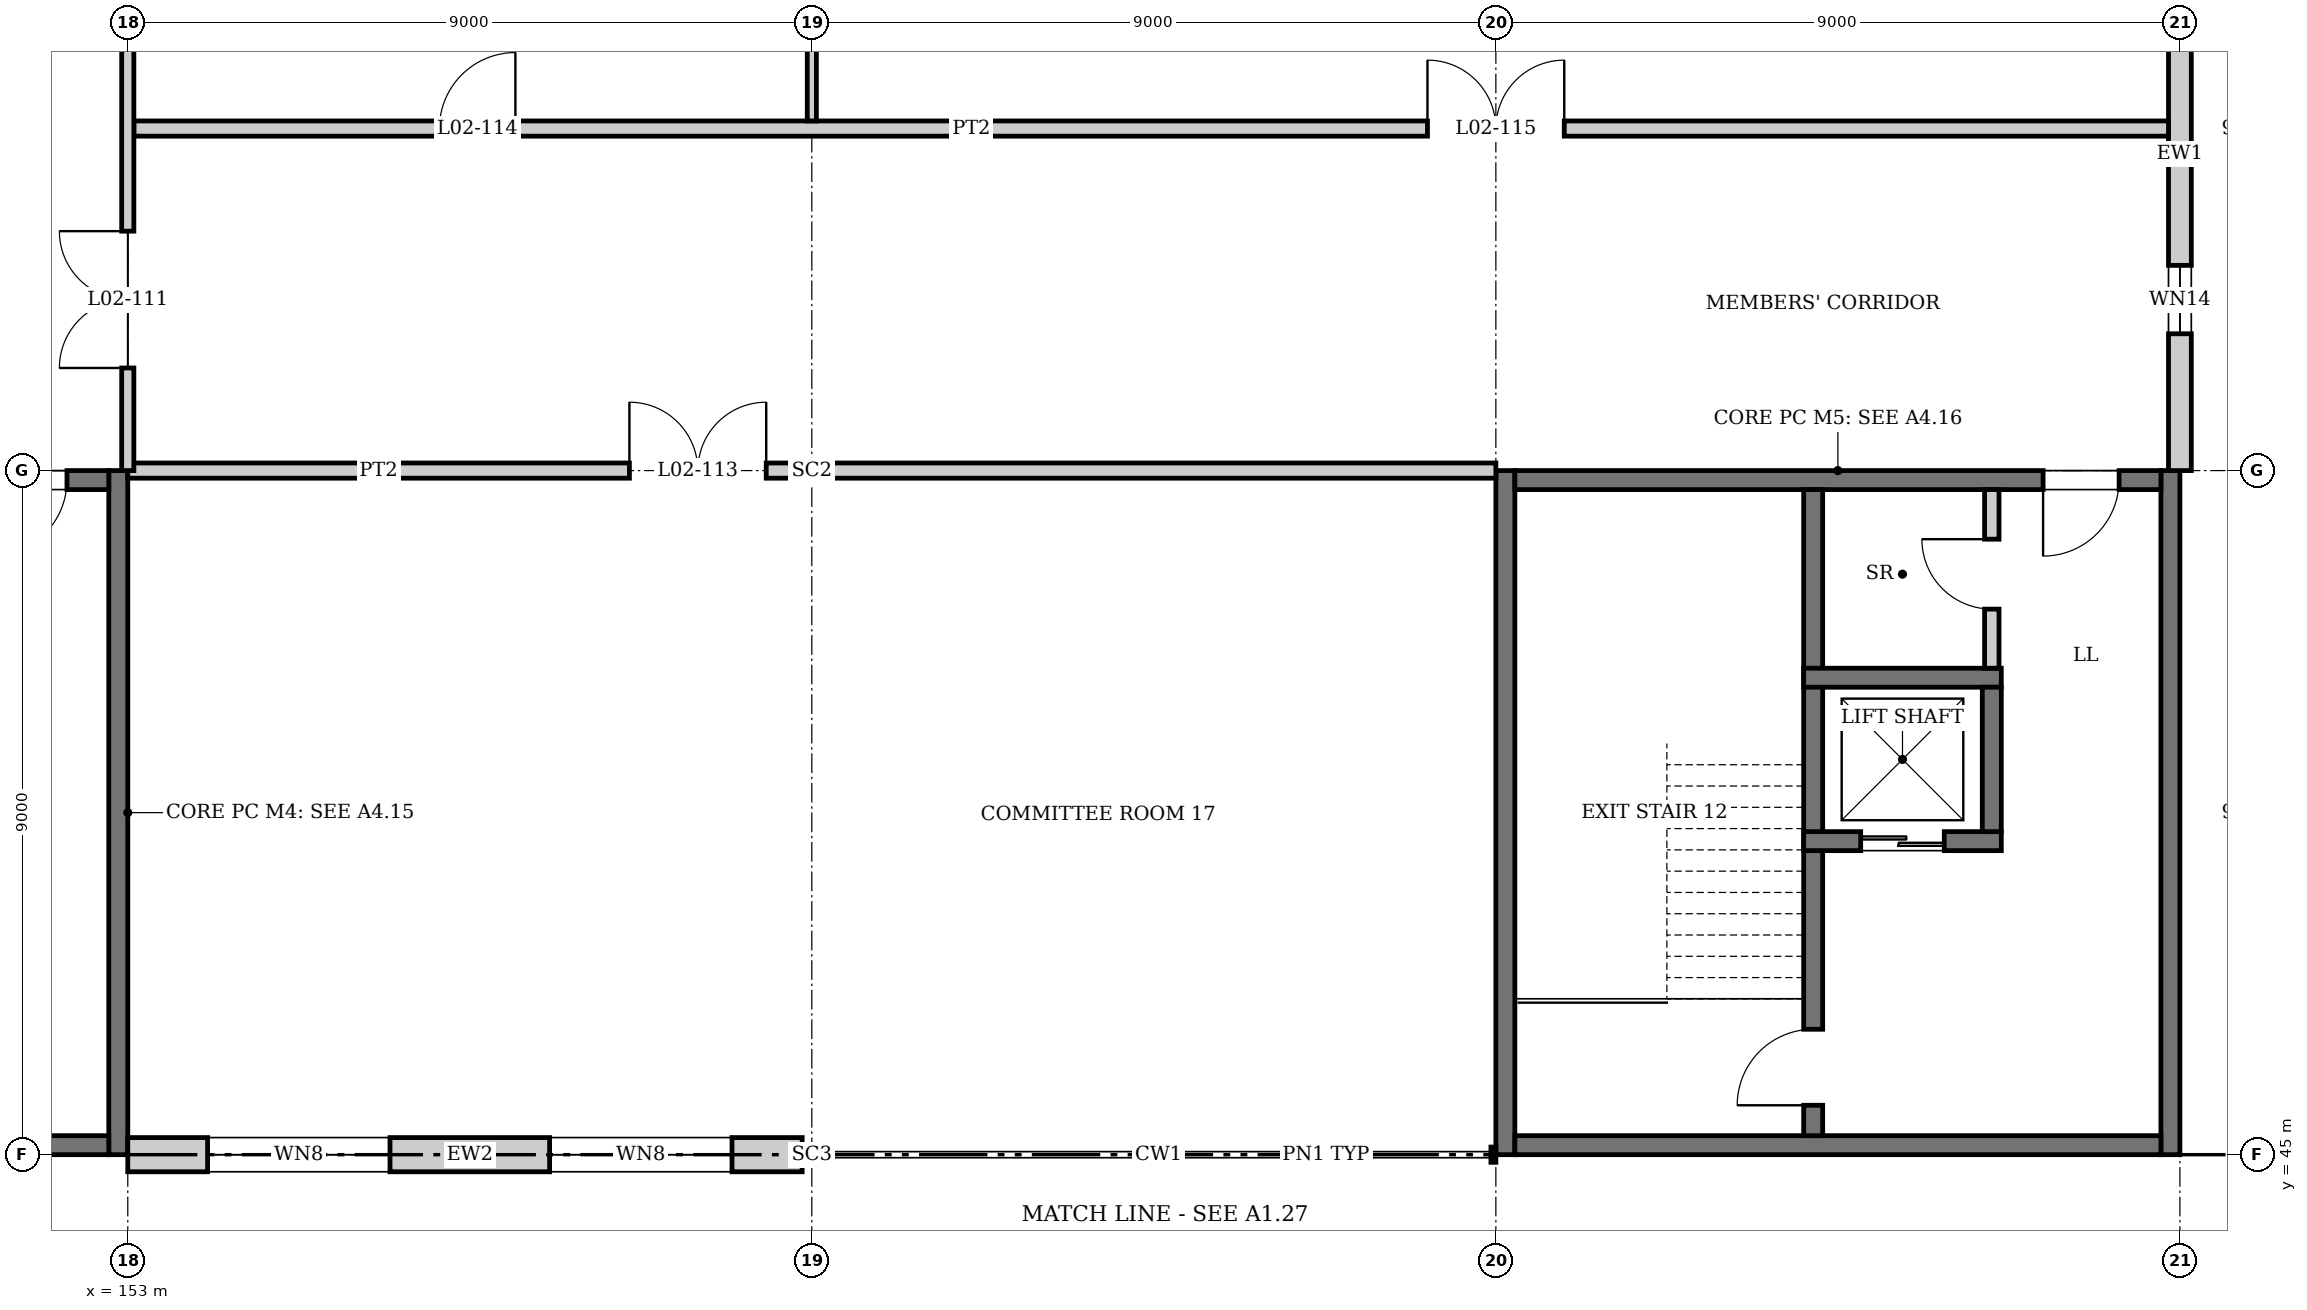
"""IFC4 building model, lengths in metres.
Left out: names, types, materials, properties, quantities, classifications, styles, units other than length and angle.
Written with IfcOpenShell. Run it as: python <this file> out.ifc"""

import sys

from ifc_helpers import new_model, si_unit, direction, frame, frame_2d, origin, origin_2d, place, context, subcontext, project, spatial, rectangle, i_section, extrude, element, fill, save


model = new_model("IFC4")
c1 = context("Model", 3, precision=1e-05, world=origin(), true_north=direction((0.0, 1.0)))
c2 = subcontext(c1, "Body", "Model", "MODEL_VIEW")
j1 = project(units=[si_unit("LENGTHUNIT", "METRE"), si_unit("PLANEANGLEUNIT", "RADIAN")], contexts=[c1])
p1 = place(None, origin())
s1 = spatial("IfcSite", under=j1, at=p1, CompositionType="ELEMENT")
p2 = place(p1, origin())
s2 = spatial("IfcBuilding", under=s1, at=p2, CompositionType="ELEMENT")
p3 = place(p2, frame((0.0, 0.0, 10.5)))
s3 = spatial("IfcBuildingStorey", under=s2, at=p3, CompositionType="ELEMENT", Elevation=10.5)
p4 = place(p3, frame((162.0, 45.0, 0.0), z_axis=(0.0, 0.0, 1.0), x_axis=(0.0, 1.0, 0.0)))
e1 = element("IfcColumn", 1, at=p4, inside=s3, PredefinedType="COLUMN", context=c2, shape_type="SweptSolid", body=[
    extrude(i_section(OverallWidth=0.254, OverallDepth=0.254, WebThickness=0.009, FlangeThickness=0.014, at=origin_2d()), origin(), (0.0, 0.0, 1.0), 4.5),
])
p5 = place(p3, frame((162.0, 54.0, 0.0), z_axis=(0.0, 0.0, 1.0), x_axis=(0.0, 1.0, 0.0)))
e2 = element("IfcColumn", 2, at=p5, inside=s3, PredefinedType="COLUMN", context=c2, shape_type="SweptSolid", body=[
    extrude(i_section(OverallWidth=0.256, OverallDepth=0.26, WebThickness=0.01, FlangeThickness=0.017, at=origin_2d()), origin(), (0.0, 0.0, 1.0), 4.5),
])
p6 = place(p3, frame((152.875, 45.0, 0.0), z_axis=(0.0, 0.0, 1.0), x_axis=(0.0, 1.0, 0.0)))
e3 = element("IfcWall", 3, at=p6, inside=s3, PredefinedType="SHEAR", context=c2, shape_type="SweptSolid", body=[
    extrude(rectangle(XDim=9.0, YDim=0.25, at=frame_2d((4.5, 0.0))), origin(), (0.0, 0.0, 1.0), 4.35),
])
p7 = place(p3, frame((144.25, 45.125, 0.0), z_axis=(0.0, 0.0, 1.0), x_axis=(1.0, 0.0, 0.0)))
e4 = element("IfcWall", 4, at=p7, inside=s3, PredefinedType="SHEAR", context=c2, shape_type="SweptSolid", body=[
    extrude(rectangle(XDim=8.5, YDim=0.25, at=frame_2d((4.25, 0.0))), origin(), (0.0, 0.0, 1.0), 4.35),
])
p8 = place(p3, frame((144.25, 53.875, 0.0), z_axis=(0.0, 0.0, 1.0), x_axis=(1.0, 0.0, 0.0)))
e5 = element("IfcWall", 5, at=p8, inside=s3, PredefinedType="SHEAR", context=c2, shape_type="SweptSolid", body=[
    extrude(rectangle(XDim=8.5, YDim=0.25, at=frame_2d((4.25, 0.0))), origin(), (0.0, 0.0, 1.0), 4.35),
])
p9 = place(p8, frame((6.95, 0.0, 0.0)))
e6 = element("IfcOpeningElement", 6, at=p9, cuts=e5, PredefinedType="OPENING", context=c2, shape_type="SweptSolid", body=[
    extrude(rectangle(XDim=1.0, YDim=2.1, at=frame_2d((0.5, 1.05))), frame((0.0, 0.135, 0.0), z_axis=(0.0, -1.0, 0.0), x_axis=(1.0, 0.0, 0.0)), (0.0, 0.0, 1.0), 0.27),
])
for number, where, z_axis, x_axis in (
    (7, (171.125, 45.0, 0.0), (0.0, 0.0, 1.0), (0.0, 1.0, 0.0)),
    (8, (179.875, 45.0, 0.0), (0.0, 0.0, 1.0), (0.0, 1.0, 0.0)),
):
    element("IfcWall", number, at=place(p3, frame(where, z_axis=z_axis, x_axis=x_axis)), inside=s3, PredefinedType="SHEAR", context=c2, shape_type="SweptSolid", body=[
        extrude(rectangle(XDim=9.0, YDim=0.25, at=frame_2d((4.5, 0.0))), origin(), (0.0, 0.0, 1.0), 4.35),
    ])
p10 = place(p3, frame((171.25, 45.125, 0.0), z_axis=(0.0, 0.0, 1.0), x_axis=(1.0, 0.0, 0.0)))
e9 = element("IfcWall", 9, at=p10, inside=s3, PredefinedType="SHEAR", context=c2, shape_type="SweptSolid", body=[
    extrude(rectangle(XDim=8.5, YDim=0.25, at=frame_2d((4.25, 0.0))), origin(), (0.0, 0.0, 1.0), 4.35),
])
p11 = place(p3, frame((171.25, 53.875, 0.0), z_axis=(0.0, 0.0, 1.0), x_axis=(1.0, 0.0, 0.0)))
e10 = element("IfcWall", 10, at=p11, inside=s3, PredefinedType="SHEAR", context=c2, shape_type="SweptSolid", body=[
    extrude(rectangle(XDim=8.5, YDim=0.25, at=frame_2d((4.25, 0.0))), origin(), (0.0, 0.0, 1.0), 4.35),
])
p12 = place(p11, frame((6.95, 0.0, 0.0)))
e11 = element("IfcOpeningElement", 11, at=p12, cuts=e10, PredefinedType="OPENING", context=c2, shape_type="SweptSolid", body=[
    extrude(rectangle(XDim=1.0, YDim=2.1, at=frame_2d((0.5, 1.05))), frame((0.0, 0.135, 0.0), z_axis=(0.0, -1.0, 0.0), x_axis=(1.0, 0.0, 0.0)), (0.0, 0.0, 1.0), 0.27),
])
p13 = place(p3, frame((153.0, 45.0, 0.0), z_axis=(0.0, 0.0, 1.0), x_axis=(1.0, 0.0, 0.0)))
e12 = element("IfcWall", 12, at=p13, inside=s3, PredefinedType="SOLIDWALL", context=c2, shape_type="SweptSolid", body=[
    extrude(rectangle(XDim=8.873, YDim=0.45, at=frame_2d((4.437, 0.0))), origin(), (0.0, 0.0, 1.0), 3.991),
])
p14 = place(p13, frame((1.05, 0.0, 0.9)))
e13 = element("IfcOpeningElement", 13, at=p14, cuts=e12, PredefinedType="OPENING", context=c2, shape_type="SweptSolid", body=[
    extrude(rectangle(XDim=2.4, YDim=2.1, at=frame_2d((1.2, 1.05))), frame((0.0, 0.235, 0.0), z_axis=(0.0, -1.0, 0.0), x_axis=(1.0, 0.0, 0.0)), (0.0, 0.0, 1.0), 0.47),
])
p15 = place(p13, frame((5.55, 0.0, 0.9)))
e14 = element("IfcOpeningElement", 14, at=p15, cuts=e12, PredefinedType="OPENING", context=c2, shape_type="SweptSolid", body=[
    extrude(rectangle(XDim=2.4, YDim=2.1, at=frame_2d((1.2, 1.05))), frame((0.0, 0.235, 0.0), z_axis=(0.0, -1.0, 0.0), x_axis=(1.0, 0.0, 0.0)), (0.0, 0.0, 1.0), 0.47),
])
p16 = place(p3, frame((180.0, 54.0, 0.0), z_axis=(0.0, 0.0, 1.0), x_axis=(0.0, 1.0, 0.0)))
e15 = element("IfcWall", 15, at=p16, inside=s3, PredefinedType="SOLIDWALL", context=c2, shape_type="SweptSolid", body=[
    extrude(rectangle(XDim=8.873, YDim=0.3, at=frame_2d((4.437, 0.0))), origin(), (0.0, 0.0, 1.0), 3.991),
])
p17 = place(p16, frame((1.8, 0.0, 0.6)))
e16 = element("IfcOpeningElement", 16, at=p17, cuts=e15, PredefinedType="OPENING", context=c2, shape_type="SweptSolid", body=[
    extrude(rectangle(XDim=0.9, YDim=2.7, at=frame_2d((0.45, 1.35))), frame((0.0, 0.16, 0.0), z_axis=(0.0, -1.0, 0.0), x_axis=(1.0, 0.0, 0.0)), (0.0, 0.0, 1.0), 0.32),
])
p18 = place(p16, frame((5.625, 0.0, 0.9)))
e17 = element("IfcOpeningElement", 17, at=p18, cuts=e15, PredefinedType="OPENING", context=c2, shape_type="SweptSolid", body=[
    extrude(rectangle(XDim=2.25, YDim=1.8, at=frame_2d((1.125, 0.9))), frame((0.0, 0.16, 0.0), z_axis=(0.0, -1.0, 0.0), x_axis=(1.0, 0.0, 0.0)), (0.0, 0.0, 1.0), 0.32),
])
p19 = place(p3, frame((175.175, 45.25, 0.0), z_axis=(0.0, 0.0, 1.0), x_axis=(0.0, 1.0, 0.0)))
e18 = element("IfcWall", 18, at=p19, inside=s3, PredefinedType="SOLIDWALL", context=c2, shape_type="SweptSolid", body=[
    extrude(rectangle(XDim=8.5, YDim=0.25, at=frame_2d((4.25, 0.0))), origin(), (0.0, 0.0, 1.0), 4.35),
])
p20 = place(p19, frame((0.4, 0.0, 0.0)))
e19 = element("IfcOpeningElement", 19, at=p20, cuts=e18, PredefinedType="OPENING", context=c2, shape_type="SweptSolid", body=[
    extrude(rectangle(XDim=1.0, YDim=2.1, at=frame_2d((0.5, 1.05))), frame((0.0, 0.135, 0.0), z_axis=(0.0, -1.0, 0.0), x_axis=(1.0, 0.0, 0.0)), (0.0, 0.0, 1.0), 0.27),
])
p21 = place(p3, frame((175.05, 49.125, 0.0), z_axis=(0.0, 0.0, 1.0), x_axis=(1.0, 0.0, 0.0)))
e20 = element("IfcWall", 20, at=p21, inside=s3, PredefinedType="SOLIDWALL", context=c2, shape_type="SweptSolid", body=[
    extrude(rectangle(XDim=2.6, YDim=0.25, at=frame_2d((1.3, 0.0))), origin(), (0.0, 0.0, 1.0), 4.35),
])
p22 = place(p21, frame((0.75, 0.0, 0.0)))
e21 = element("IfcOpeningElement", 21, at=p22, cuts=e20, PredefinedType="OPENING", context=c2, shape_type="SweptSolid", body=[
    extrude(rectangle(XDim=1.1, YDim=2.1, at=frame_2d((0.55, 1.05))), frame((0.0, 0.135, 0.0), z_axis=(0.0, -1.0, 0.0), x_axis=(1.0, 0.0, 0.0)), (0.0, 0.0, 1.0), 0.27),
])
p23 = place(p3, frame((175.05, 51.275, 0.0), z_axis=(0.0, 0.0, 1.0), x_axis=(1.0, 0.0, 0.0)))
e22 = element("IfcWall", 22, at=p23, inside=s3, PredefinedType="SOLIDWALL", context=c2, shape_type="SweptSolid", body=[
    extrude(rectangle(XDim=2.6, YDim=0.25, at=frame_2d((1.3, 0.0))), origin(), (0.0, 0.0, 1.0), 4.35),
])
p24 = place(p3, frame((177.525, 49.25, 0.0), z_axis=(0.0, 0.0, 1.0), x_axis=(0.0, 1.0, 0.0)))
e23 = element("IfcWall", 23, at=p24, inside=s3, PredefinedType="SOLIDWALL", context=c2, shape_type="SweptSolid", body=[
    extrude(rectangle(XDim=1.9, YDim=0.25, at=frame_2d((0.95, 0.0))), origin(), (0.0, 0.0, 1.0), 4.35),
])
p25 = place(p3, frame((153.0, 54.0, 0.0), z_axis=(0.0, 0.0, 1.0), x_axis=(1.0, 0.0, 0.0)))
e24 = element("IfcWall", 24, at=p25, inside=s3, PredefinedType="PARTITIONING", context=c2, shape_type="SweptSolid", body=[
    extrude(rectangle(XDim=8.87, YDim=0.2, at=frame_2d((4.435, 0.0))), origin(), (0.0, 0.0, 1.0), 3.738),
])
p26 = place(p25, frame((6.6, 0.0, 0.0)))
e25 = element("IfcOpeningElement", 25, at=p26, cuts=e24, PredefinedType="OPENING", context=c2, shape_type="SweptSolid", body=[
    extrude(rectangle(XDim=1.8, YDim=2.1, at=frame_2d((0.9, 1.05))), frame((0.0, 0.11, 0.0), z_axis=(0.0, -1.0, 0.0), x_axis=(1.0, 0.0, 0.0)), (0.0, 0.0, 1.0), 0.22),
])
p27 = place(p3, frame((162.13, 54.0, 0.0), z_axis=(0.0, 0.0, 1.0), x_axis=(1.0, 0.0, 0.0)))
e26 = element("IfcWall", 26, at=p27, inside=s3, PredefinedType="PARTITIONING", context=c2, shape_type="SweptSolid", body=[
    extrude(rectangle(XDim=8.87, YDim=0.2, at=frame_2d((4.435, 0.0))), origin(), (0.0, 0.0, 1.0), 3.738),
])
p28 = place(p3, frame((153.08, 58.5, 0.0), z_axis=(0.0, 0.0, 1.0), x_axis=(1.0, 0.0, 0.0)))
e27 = element("IfcWall", 27, at=p28, inside=s3, PredefinedType="PARTITIONING", context=c2, shape_type="SweptSolid", body=[
    extrude(rectangle(XDim=26.77, YDim=0.2, at=frame_2d((13.385, 0.0))), origin(), (0.0, 0.0, 1.0), 3.65),
])
p29 = place(p28, frame((4.02, 0.0, 0.0)))
e28 = element("IfcOpeningElement", 28, at=p29, cuts=e27, PredefinedType="OPENING", context=c2, shape_type="SweptSolid", body=[
    extrude(rectangle(XDim=1.0, YDim=2.1, at=frame_2d((0.5, 1.05))), frame((0.0, 0.11, 0.0), z_axis=(0.0, -1.0, 0.0), x_axis=(1.0, 0.0, 0.0)), (0.0, 0.0, 1.0), 0.22),
])
p30 = place(p28, frame((17.02, 0.0, 0.0)))
e29 = element("IfcOpeningElement", 29, at=p30, cuts=e27, PredefinedType="OPENING", context=c2, shape_type="SweptSolid", body=[
    extrude(rectangle(XDim=1.8, YDim=2.1, at=frame_2d((0.9, 1.05))), frame((0.0, 0.11, 0.0), z_axis=(0.0, -1.0, 0.0), x_axis=(1.0, 0.0, 0.0)), (0.0, 0.0, 1.0), 0.22),
])
p31 = place(p3, frame((153.0, 54.0, 0.0), z_axis=(0.0, 0.0, 1.0), x_axis=(0.0, 1.0, 0.0)))
e30 = element("IfcWall", 30, at=p31, inside=s3, PredefinedType="PARTITIONING", context=c2, shape_type="SweptSolid", body=[
    extrude(rectangle(XDim=17.87, YDim=0.16, at=frame_2d((8.935, 0.0))), origin(), (0.0, 0.0, 1.0), 3.65),
])
p32 = place(p31, frame((1.35, 0.0, 0.0)))
e31 = element("IfcOpeningElement", 31, at=p32, cuts=e30, PredefinedType="OPENING", context=c2, shape_type="SweptSolid", body=[
    extrude(rectangle(XDim=1.8, YDim=2.1, at=frame_2d((0.9, 1.05))), frame((0.0, 0.09, 0.0), z_axis=(0.0, -1.0, 0.0), x_axis=(1.0, 0.0, 0.0)), (0.0, 0.0, 1.0), 0.18),
])
p33 = place(p31, frame((14.85, 0.0, 0.0)))
e32 = element("IfcOpeningElement", 32, at=p33, cuts=e30, PredefinedType="OPENING", context=c2, shape_type="SweptSolid", body=[
    extrude(rectangle(XDim=1.8, YDim=2.1, at=frame_2d((0.9, 1.05))), frame((0.0, 0.09, 0.0), z_axis=(0.0, -1.0, 0.0), x_axis=(1.0, 0.0, 0.0)), (0.0, 0.0, 1.0), 0.18),
])
p34 = place(p3, frame((162.0, 58.6, 0.0), z_axis=(0.0, 0.0, 1.0), x_axis=(0.0, 1.0, 0.0)))
e33 = element("IfcWall", 33, at=p34, inside=s3, PredefinedType="PARTITIONING", context=c2, shape_type="SweptSolid", body=[
    extrude(rectangle(XDim=8.8, YDim=0.12, at=frame_2d((4.4, 0.0))), origin(), (0.0, 0.0, 1.0), 3.65),
])
p35 = place(p3, frame((177.525, 51.4, 0.0), z_axis=(0.0, 0.0, 1.0), x_axis=(0.0, 1.0, 0.0)))
e34 = element("IfcWall", 34, at=p35, inside=s3, PredefinedType="PARTITIONING", context=c2, shape_type="SweptSolid", body=[
    extrude(rectangle(XDim=2.35, YDim=0.19, at=frame_2d((1.175, 0.0))), origin(), (0.0, 0.0, 1.0), 4.35),
])
p36 = place(p35, frame((0.778, 0.0, 0.0)))
e35 = element("IfcOpeningElement", 35, at=p36, cuts=e34, PredefinedType="OPENING", context=c2, shape_type="SweptSolid", body=[
    extrude(rectangle(XDim=0.92, YDim=2.1, at=frame_2d((0.46, 1.05))), frame((0.0, 0.105, 0.0), z_axis=(0.0, -1.0, 0.0), x_axis=(1.0, 0.0, 0.0)), (0.0, 0.0, 1.0), 0.21),
])
p37 = place(p14, origin())
e36 = element("IfcWindow", 36, at=p37, inside=s3, PartitioningType="SINGLE_PANEL", PredefinedType="WINDOW", context=c2, shape_type="SweptSolid", body=[
    extrude(rectangle(XDim=2.4, YDim=2.1, at=frame_2d((1.2, 1.05))), frame((0.0, 0.03, 0.0), z_axis=(0.0, -1.0, 0.0), x_axis=(1.0, 0.0, 0.0)), (0.0, 0.0, 1.0), 0.06),
])
fill(e13, e36)
p38 = place(p15, origin())
e37 = element("IfcWindow", 37, at=p38, inside=s3, PartitioningType="SINGLE_PANEL", PredefinedType="WINDOW", context=c2, shape_type="SweptSolid", body=[
    extrude(rectangle(XDim=2.4, YDim=2.1, at=frame_2d((1.2, 1.05))), frame((0.0, 0.03, 0.0), z_axis=(0.0, -1.0, 0.0), x_axis=(1.0, 0.0, 0.0)), (0.0, 0.0, 1.0), 0.06),
])
fill(e14, e37)
p39 = place(p17, origin())
e38 = element("IfcWindow", 38, at=p39, inside=s3, PartitioningType="SINGLE_PANEL", PredefinedType="WINDOW", context=c2, shape_type="SweptSolid", body=[
    extrude(rectangle(XDim=0.9, YDim=2.7, at=frame_2d((0.45, 1.35))), frame((0.0, 0.03, 0.0), z_axis=(0.0, -1.0, 0.0), x_axis=(1.0, 0.0, 0.0)), (0.0, 0.0, 1.0), 0.06),
])
fill(e16, e38)
p40 = place(p22, origin())
e39 = element("IfcDoor", 39, at=p40, inside=s3, OperationType="DOUBLE_DOOR_SLIDING", PredefinedType="DOOR", context=c2, shape_type="SweptSolid", body=[
    extrude(rectangle(XDim=1.1, YDim=2.1, at=frame_2d((0.55, 1.05))), frame((0.0, 0.025, 0.0), z_axis=(0.0, -1.0, 0.0), x_axis=(1.0, 0.0, 0.0)), (0.0, 0.0, 1.0), 0.05),
])
fill(e21, e39)
p41 = place(p9, frame((1.0, 0.0, 0.0), z_axis=(0.0, 0.0, 1.0), x_axis=(-1.0, 0.0, 0.0)))
e40 = element("IfcDoor", 40, at=p41, inside=s3, OperationType="SINGLE_SWING_RIGHT", PredefinedType="DOOR", context=c2, shape_type="SweptSolid", body=[
    extrude(rectangle(XDim=1.0, YDim=2.1, at=frame_2d((0.5, 1.05))), frame((0.0, 0.025, 0.0), z_axis=(0.0, -1.0, 0.0), x_axis=(1.0, 0.0, 0.0)), (0.0, 0.0, 1.0), 0.05),
])
fill(e6, e40)
p42 = place(p20, origin())
e41 = element("IfcDoor", 41, at=p42, inside=s3, OperationType="SINGLE_SWING_LEFT", PredefinedType="DOOR", context=c2, shape_type="SweptSolid", body=[
    extrude(rectangle(XDim=1.0, YDim=2.1, at=frame_2d((0.5, 1.05))), frame((0.0, 0.025, 0.0), z_axis=(0.0, -1.0, 0.0), x_axis=(1.0, 0.0, 0.0)), (0.0, 0.0, 1.0), 0.05),
])
fill(e19, e41)
p43 = place(p12, frame((1.0, 0.0, 0.0), z_axis=(0.0, 0.0, 1.0), x_axis=(-1.0, 0.0, 0.0)))
e42 = element("IfcDoor", 42, at=p43, inside=s3, OperationType="SINGLE_SWING_RIGHT", PredefinedType="DOOR", context=c2, shape_type="SweptSolid", body=[
    extrude(rectangle(XDim=1.0, YDim=2.1, at=frame_2d((0.5, 1.05))), frame((0.0, 0.025, 0.0), z_axis=(0.0, -1.0, 0.0), x_axis=(1.0, 0.0, 0.0)), (0.0, 0.0, 1.0), 0.05),
])
fill(e11, e42)
p44 = place(p36, origin())
e43 = element("IfcDoor", 43, at=p44, inside=s3, OperationType="SINGLE_SWING_RIGHT", PredefinedType="DOOR", context=c2, shape_type="SweptSolid", body=[
    extrude(rectangle(XDim=0.92, YDim=2.1, at=frame_2d((0.46, 1.05))), frame((0.0, 0.025, 0.0), z_axis=(0.0, -1.0, 0.0), x_axis=(1.0, 0.0, 0.0)), (0.0, 0.0, 1.0), 0.05),
])
fill(e35, e43)
p45 = place(p32, origin())
e44 = element("IfcDoor", 44, at=p45, inside=s3, OperationType="DOUBLE_DOOR_SINGLE_SWING", PredefinedType="DOOR", context=c2, shape_type="SweptSolid", body=[
    extrude(rectangle(XDim=1.8, YDim=2.1, at=frame_2d((0.9, 1.05))), frame((0.0, 0.025, 0.0), z_axis=(0.0, -1.0, 0.0), x_axis=(1.0, 0.0, 0.0)), (0.0, 0.0, 1.0), 0.05),
])
fill(e31, e44)
p46 = place(p26, origin())
e45 = element("IfcDoor", 45, at=p46, inside=s3, OperationType="DOUBLE_DOOR_SINGLE_SWING", PredefinedType="DOOR", context=c2, shape_type="SweptSolid", body=[
    extrude(rectangle(XDim=1.8, YDim=2.1, at=frame_2d((0.9, 1.05))), frame((0.0, 0.025, 0.0), z_axis=(0.0, -1.0, 0.0), x_axis=(1.0, 0.0, 0.0)), (0.0, 0.0, 1.0), 0.05),
])
fill(e25, e45)
p47 = place(p29, origin())
e46 = element("IfcDoor", 46, at=p47, inside=s3, OperationType="SINGLE_SWING_RIGHT", PredefinedType="DOOR", context=c2, shape_type="SweptSolid", body=[
    extrude(rectangle(XDim=1.0, YDim=2.1, at=frame_2d((0.5, 1.05))), frame((0.0, 0.025, 0.0), z_axis=(0.0, -1.0, 0.0), x_axis=(1.0, 0.0, 0.0)), (0.0, 0.0, 1.0), 0.05),
])
fill(e28, e46)
p48 = place(p30, origin())
e47 = element("IfcDoor", 47, at=p48, inside=s3, OperationType="DOUBLE_DOOR_SINGLE_SWING", PredefinedType="DOOR", context=c2, shape_type="SweptSolid", body=[
    extrude(rectangle(XDim=1.8, YDim=2.1, at=frame_2d((0.9, 1.05))), frame((0.0, 0.025, 0.0), z_axis=(0.0, -1.0, 0.0), x_axis=(1.0, 0.0, 0.0)), (0.0, 0.0, 1.0), 0.05),
])
fill(e29, e47)
save(model, sys.argv[1])
